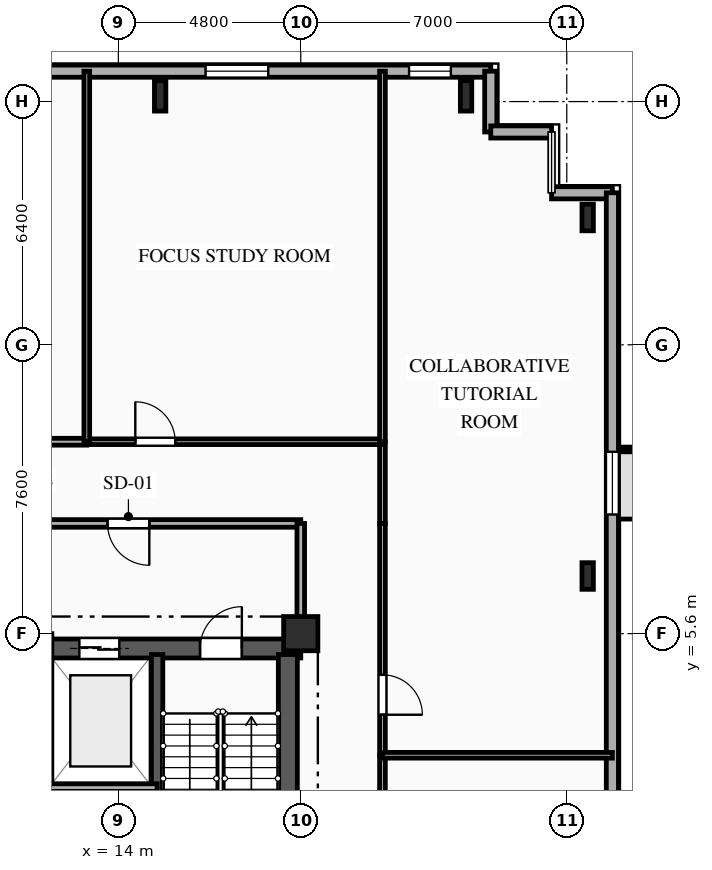
"""IFC4 building model, lengths in metres.
Left out: names, types, materials, properties, quantities, classifications, styles, units other than length and angle.
Written with IfcOpenShell. Run it as: python <this file> out.ifc"""

import sys

from ifc_helpers import new_model, si_unit, direction, frame, frame_2d, origin, origin_2d, place, context, subcontext, project, spatial, rectangle, i_section, extrude, element, fill, save


model = new_model("IFC4")
c1 = context("Model", 3, precision=1e-05, world=origin(), true_north=direction((0.0, 1.0)))
c2 = subcontext(c1, "Body", "Model", "MODEL_VIEW")
j1 = project(units=[si_unit("LENGTHUNIT", "METRE"), si_unit("PLANEANGLEUNIT", "RADIAN")], contexts=[c1])
p1 = place(None, origin())
s1 = spatial("IfcSite", under=j1, at=p1, CompositionType="ELEMENT")
p2 = place(p1, origin())
s2 = spatial("IfcBuilding", under=s1, at=p2, CompositionType="ELEMENT")
p3 = place(p2, frame((0.0, 0.0, 167.85)))
s3 = spatial("IfcBuildingStorey", under=s2, at=p3, CompositionType="ELEMENT", Elevation=167.85)
p4 = place(p3, frame((18.8, 5.6, 0.0), z_axis=(0.0, 0.0, 1.0), x_axis=(1.0, 0.0, 0.0)))
e1 = element("IfcColumn", 1, at=p4, inside=s3, PredefinedType="COLUMN", context=c2, shape_type="SweptSolid", body=[
    extrude(rectangle(XDim=0.9, YDim=0.9, at=origin_2d()), origin(), (0.0, 0.0, 1.0), 3.35),
])
for number, where, z_axis, x_axis in (
    (2, (23.15, 19.75, 0.0), (0.0, 0.0, 1.0), (1.0, 0.0, 0.0)),
    (3, (15.1, 19.75, 0.0), (0.0, 0.0, 1.0), (1.0, 0.0, 0.0)),
):
    element("IfcColumn", number, at=place(p3, frame(where, z_axis=z_axis, x_axis=x_axis)), inside=s3, PredefinedType="COLUMN", context=c2, shape_type="SweptSolid", body=[
        extrude(i_section(OverallWidth=0.3, OverallDepth=0.8, WebThickness=0.018, FlangeThickness=0.033, FilletRadius=0.03, at=origin_2d()), origin(), (0.0, 0.0, 1.0), 3.35),
    ])
for number, where, z_axis, x_axis in (
    (4, (26.35, 7.117, 0.0), (0.0, 0.0, 1.0), (1.0, 0.0, 0.0)),
    (5, (26.35, 16.55, 0.0), (0.0, 0.0, 1.0), (1.0, 0.0, 0.0)),
):
    element("IfcColumn", number, at=place(p3, frame(where, z_axis=z_axis, x_axis=x_axis)), inside=s3, PredefinedType="COLUMN", context=c2, shape_type="SweptSolid", body=[
        extrude(i_section(OverallWidth=0.3, OverallDepth=0.7, WebThickness=0.017, FlangeThickness=0.032, FilletRadius=0.027, at=origin_2d()), origin(), (0.0, 0.0, 1.0), 3.35),
    ])
p5 = place(p3, frame((-25.8, 20.4, 0.0), z_axis=(0.0, 0.0, 1.0), x_axis=(1.0, 0.0, 0.0)))
e6 = element("IfcWall", 6, at=p5, inside=s3, PredefinedType="SOLIDWALL", context=c2, shape_type="SweptSolid", body=[
    extrude(rectangle(XDim=49.6, YDim=0.32, at=frame_2d((24.8, 0.0))), origin(), (0.0, 0.0, 1.0), 3.04),
])
p6 = place(p5, frame((2.135, 0.0, 0.85)))
e7 = element("IfcOpeningElement", 7, at=p6, cuts=e6, PredefinedType="OPENING", context=c2, shape_type="SweptSolid", body=[
    extrude(rectangle(XDim=1.65, YDim=1.85, at=frame_2d((0.825, 0.925))), frame((0.0, 0.17, 0.0), z_axis=(0.0, -1.0, 0.0), x_axis=(1.0, 0.0, 0.0)), (0.0, 0.0, 1.0), 0.34),
])
p7 = place(p5, frame((6.295, 0.0, 0.85)))
e8 = element("IfcOpeningElement", 8, at=p7, cuts=e6, PredefinedType="OPENING", context=c2, shape_type="SweptSolid", body=[
    extrude(rectangle(XDim=1.65, YDim=1.85, at=frame_2d((0.825, 0.925))), frame((0.0, 0.17, 0.0), z_axis=(0.0, -1.0, 0.0), x_axis=(1.0, 0.0, 0.0)), (0.0, 0.0, 1.0), 0.34),
])
p8 = place(p5, frame((10.775, 0.0, 0.85)))
e9 = element("IfcOpeningElement", 9, at=p8, cuts=e6, PredefinedType="OPENING", context=c2, shape_type="SweptSolid", body=[
    extrude(rectangle(XDim=1.65, YDim=1.85, at=frame_2d((0.825, 0.925))), frame((0.0, 0.17, 0.0), z_axis=(0.0, -1.0, 0.0), x_axis=(1.0, 0.0, 0.0)), (0.0, 0.0, 1.0), 0.34),
])
p9 = place(p5, frame((18.44, 0.0, 0.85)))
e10 = element("IfcOpeningElement", 10, at=p9, cuts=e6, PredefinedType="OPENING", context=c2, shape_type="SweptSolid", body=[
    extrude(rectangle(XDim=1.6, YDim=1.85, at=frame_2d((0.8, 0.925))), frame((0.0, 0.17, 0.0), z_axis=(0.0, -1.0, 0.0), x_axis=(1.0, 0.0, 0.0)), (0.0, 0.0, 1.0), 0.34),
])
p10 = place(p5, frame((25.34, 0.0, 0.85)))
e11 = element("IfcOpeningElement", 11, at=p10, cuts=e6, PredefinedType="OPENING", context=c2, shape_type="SweptSolid", body=[
    extrude(rectangle(XDim=2.2, YDim=1.85, at=frame_2d((1.1, 0.925))), frame((0.0, 0.17, 0.0), z_axis=(0.0, -1.0, 0.0), x_axis=(1.0, 0.0, 0.0)), (0.0, 0.0, 1.0), 0.34),
])
p11 = place(p5, frame((33.74, 0.0, 0.85)))
e12 = element("IfcOpeningElement", 12, at=p11, cuts=e6, PredefinedType="OPENING", context=c2, shape_type="SweptSolid", body=[
    extrude(rectangle(XDim=2.2, YDim=1.85, at=frame_2d((1.1, 0.925))), frame((0.0, 0.17, 0.0), z_axis=(0.0, -1.0, 0.0), x_axis=(1.0, 0.0, 0.0)), (0.0, 0.0, 1.0), 0.34),
])
p12 = place(p5, frame((42.095, 0.0, 0.85)))
e13 = element("IfcOpeningElement", 13, at=p12, cuts=e6, PredefinedType="OPENING", context=c2, shape_type="SweptSolid", body=[
    extrude(rectangle(XDim=1.65, YDim=1.85, at=frame_2d((0.825, 0.925))), frame((0.0, 0.17, 0.0), z_axis=(0.0, -1.0, 0.0), x_axis=(1.0, 0.0, 0.0)), (0.0, 0.0, 1.0), 0.34),
])
p13 = place(p5, frame((47.45, 0.0, 0.85)))
e14 = element("IfcOpeningElement", 14, at=p13, cuts=e6, PredefinedType="OPENING", context=c2, shape_type="SweptSolid", body=[
    extrude(rectangle(XDim=1.1, YDim=1.85, at=frame_2d((0.55, 0.925))), frame((0.0, 0.17, 0.0), z_axis=(0.0, -1.0, 0.0), x_axis=(1.0, 0.0, 0.0)), (0.0, 0.0, 1.0), 0.34),
])
for number, where, z_axis, x_axis in (
    (15, (23.8, 20.4, 0.0), (0.0, 0.0, 1.0), (0.0, -1.0, 0.0)),
    (16, (23.8, 18.8, 0.0), (0.0, 0.0, 1.0), (1.0, 0.0, 0.0)),
):
    element("IfcWall", number, at=place(p3, frame(where, z_axis=z_axis, x_axis=x_axis)), inside=s3, PredefinedType="SOLIDWALL", context=c2, shape_type="SweptSolid", body=[
        extrude(rectangle(XDim=1.6, YDim=0.32, at=frame_2d((0.8, 0.0))), origin(), (0.0, 0.0, 1.0), 3.04),
    ])
p14 = place(p3, frame((25.4, 17.2, 0.0), z_axis=(0.0, 0.0, 1.0), x_axis=(1.0, 0.0, 0.0)))
e17 = element("IfcWall", 17, at=p14, inside=s3, PredefinedType="SOLIDWALL", context=c2, shape_type="SweptSolid", body=[
    extrude(rectangle(XDim=1.6, YDim=0.32, at=frame_2d((0.8, 0.0))), origin(), (0.0, 0.0, 1.0), 3.04),
])
p15 = place(p3, frame((27.0, 17.2, 0.0), z_axis=(0.0, 0.0, 1.0), x_axis=(0.0, -1.0, 0.0)))
e18 = element("IfcWall", 18, at=p15, inside=s3, PredefinedType="SOLIDWALL", context=c2, shape_type="SweptSolid", body=[
    extrude(rectangle(XDim=29.6, YDim=0.32, at=frame_2d((14.8, 0.0))), origin(), (0.0, 0.0, 1.0), 3.04),
])
p16 = place(p15, frame((6.815, 0.0, 0.85)))
e19 = element("IfcOpeningElement", 19, at=p16, cuts=e18, PredefinedType="OPENING", context=c2, shape_type="SweptSolid", body=[
    extrude(rectangle(XDim=1.65, YDim=1.85, at=frame_2d((0.825, 0.925))), frame((0.0, 0.17, 0.0), z_axis=(0.0, -1.0, 0.0), x_axis=(1.0, 0.0, 0.0)), (0.0, 0.0, 1.0), 0.34),
])
p17 = place(p15, frame((21.175, 0.0, 0.85)))
e20 = element("IfcOpeningElement", 20, at=p17, cuts=e18, PredefinedType="OPENING", context=c2, shape_type="SweptSolid", body=[
    extrude(rectangle(XDim=1.65, YDim=1.85, at=frame_2d((0.825, 0.925))), frame((0.0, 0.17, 0.0), z_axis=(0.0, -1.0, 0.0), x_axis=(1.0, 0.0, 0.0)), (0.0, 0.0, 1.0), 0.34),
])
p18 = place(p3, frame((9.2, 5.21, 0.0), z_axis=(0.0, 0.0, 1.0), x_axis=(1.0, 0.0, 0.0)))
e21 = element("IfcWall", 21, at=p18, inside=s3, PredefinedType="SHEAR", context=c2, shape_type="SweptSolid", body=[
    extrude(rectangle(XDim=9.6, YDim=0.5, at=frame_2d((4.8, 0.0))), origin(), (0.0, 0.0, 1.0), 3.04),
])
p19 = place(p18, frame((6.95, 0.0, 0.0)))
e22 = element("IfcOpeningElement", 22, at=p19, cuts=e21, PredefinedType="OPENING", context=c2, shape_type="SweptSolid", body=[
    extrude(rectangle(XDim=1.1, YDim=2.15, at=frame_2d((0.55, 1.075))), frame((0.0, 0.26, 0.0), z_axis=(0.0, -1.0, 0.0), x_axis=(1.0, 0.0, 0.0)), (0.0, 0.0, 1.0), 0.52),
])
p20 = place(p18, frame((3.775, 0.0, 0.0)))
e23 = element("IfcOpeningElement", 23, at=p20, cuts=e21, PredefinedType="OPENING", context=c2, shape_type="SweptSolid", body=[
    extrude(rectangle(XDim=1.05, YDim=2.1, at=frame_2d((0.525, 1.05))), frame((0.0, 0.26, 0.0), z_axis=(0.0, -1.0, 0.0), x_axis=(1.0, 0.0, 0.0)), (0.0, 0.0, 1.0), 0.52),
])
p21 = place(p3, frame((18.46, -5.05, 0.0), z_axis=(0.0, 0.0, 1.0), x_axis=(0.0, 1.0, 0.0)))
e24 = element("IfcWall", 24, at=p21, inside=s3, PredefinedType="SHEAR", context=c2, shape_type="SweptSolid", body=[
    extrude(rectangle(XDim=10.1, YDim=0.5, at=frame_2d((5.05, 0.0))), origin(), (0.0, 0.0, 1.0), 3.04),
])
p22 = place(p3, frame((15.02, -5.05, 0.0), z_axis=(0.0, 0.0, 1.0), x_axis=(0.0, 1.0, 0.0)))
e25 = element("IfcWall", 25, at=p22, inside=s3, PredefinedType="SHEAR", context=c2, shape_type="SweptSolid", body=[
    extrude(rectangle(XDim=10.1, YDim=0.3, at=frame_2d((5.05, 0.0))), origin(), (0.0, 0.0, 1.0), 3.04),
])
p23 = place(p3, frame((12.15, 5.6, 0.0), z_axis=(0.0, 0.0, 1.0), x_axis=(0.0, -1.0, 0.0)))
e26 = element("IfcWall", 26, at=p23, inside=s3, PredefinedType="PARTITIONING", context=c2, shape_type="SweptSolid", body=[
    extrude(rectangle(XDim=4.05, YDim=0.2, at=frame_2d((2.025, 0.0))), origin(), (0.0, 0.0, 1.0), 3.04),
])
p24 = place(p3, frame((18.8, 8.5, 0.0), z_axis=(0.0, 0.0, 1.0), x_axis=(-1.0, 0.0, 0.0)))
e27 = element("IfcWall", 27, at=p24, inside=s3, PredefinedType="PARTITIONING", context=c2, shape_type="SweptSolid", body=[
    extrude(rectangle(XDim=6.8, YDim=0.2, at=frame_2d((3.4, 0.0))), origin(), (0.0, 0.0, 1.0), 3.04),
])
p25 = place(p24, frame((3.985, 0.0, 0.0)))
e28 = element("IfcOpeningElement", 28, at=p25, cuts=e27, PredefinedType="OPENING", context=c2, shape_type="SweptSolid", body=[
    extrude(rectangle(XDim=1.1, YDim=2.15, at=frame_2d((0.55, 1.075))), frame((0.0, 0.11, 0.0), z_axis=(0.0, -1.0, 0.0), x_axis=(1.0, 0.0, 0.0)), (0.0, 0.0, 1.0), 0.22),
])
p26 = place(p3, frame((18.8, 5.6, 0.0), z_axis=(0.0, 0.0, 1.0), x_axis=(0.0, 1.0, 0.0)))
e29 = element("IfcWall", 29, at=p26, inside=s3, PredefinedType="PARTITIONING", context=c2, shape_type="SweptSolid", body=[
    extrude(rectangle(XDim=2.9, YDim=0.2, at=frame_2d((1.45, 0.0))), origin(), (0.0, 0.0, 1.0), 2.525),
])
p27 = place(p3, frame((13.34, -0.75, 0.0), z_axis=(0.0, 0.0, 1.0), x_axis=(0.0, 1.0, 0.0)))
e30 = element("IfcWall", 30, at=p27, inside=s3, PredefinedType="PARTITIONING", context=c2, shape_type="SweptSolid", body=[
    extrude(rectangle(XDim=2.3, YDim=0.2, at=frame_2d((1.15, 0.0))), origin(), (0.0, 0.0, 1.0), 3.04),
])
p28 = place(p3, frame((20.95, 10.65, 0.0), z_axis=(0.0, 0.0, 1.0), x_axis=(0.0, -1.0, 0.0)))
e31 = element("IfcWall", 31, at=p28, inside=s3, PredefinedType="PARTITIONING", context=c2, shape_type="SweptSolid", body=[
    extrude(rectangle(XDim=2.15, YDim=0.15, at=frame_2d((1.075, 0.0))), origin(), (0.0, 0.0, 1.0), 3.04),
])
p29 = place(p3, frame((7.24, 10.65, 0.0), z_axis=(0.0, 0.0, 1.0), x_axis=(1.0, 0.0, 0.0)))
e32 = element("IfcWall", 32, at=p29, inside=s3, PredefinedType="PARTITIONING", context=c2, shape_type="SweptSolid", body=[
    extrude(rectangle(XDim=5.93, YDim=0.18, at=frame_2d((2.965, 0.0))), origin(), (0.0, 0.0, 1.0), 3.04),
])
p30 = place(p29, frame((3.879, 0.0, 0.0)))
e33 = element("IfcOpeningElement", 33, at=p30, cuts=e32, PredefinedType="OPENING", context=c2, shape_type="SweptSolid", body=[
    extrude(rectangle(XDim=1.0, YDim=2.15, at=frame_2d((0.5, 1.075))), frame((0.0, 0.1, 0.0), z_axis=(0.0, -1.0, 0.0), x_axis=(1.0, 0.0, 0.0)), (0.0, 0.0, 1.0), 0.2),
])
p31 = place(p3, frame((13.17, 10.65, 0.0), z_axis=(0.0, 0.0, 1.0), x_axis=(1.0, 0.0, 0.0)))
e34 = element("IfcWall", 34, at=p31, inside=s3, PredefinedType="PARTITIONING", context=c2, shape_type="SweptSolid", body=[
    extrude(rectangle(XDim=7.78, YDim=0.15, at=frame_2d((3.89, 0.0))), origin(), (0.0, 0.0, 1.0), 3.04),
])
p32 = place(p31, frame((1.276, 0.0, 0.0)))
e35 = element("IfcOpeningElement", 35, at=p32, cuts=e34, PredefinedType="OPENING", context=c2, shape_type="SweptSolid", body=[
    extrude(rectangle(XDim=1.05, YDim=2.15, at=frame_2d((0.525, 1.075))), frame((0.0, 0.085, 0.0), z_axis=(0.0, -1.0, 0.0), x_axis=(1.0, 0.0, 0.0)), (0.0, 0.0, 1.0), 0.17),
])
p33 = place(p3, frame((20.95, 2.4, 0.0), z_axis=(0.0, 0.0, 1.0), x_axis=(0.0, -1.0, 0.0)))
e36 = element("IfcWall", 36, at=p33, inside=s3, PredefinedType="PARTITIONING", context=c2, shape_type="SweptSolid", body=[
    extrude(rectangle(XDim=8.0, YDim=0.15, at=frame_2d((4.0, 0.0))), origin(), (0.0, 0.0, 1.0), 3.04),
])
p34 = place(p33, frame((2.028, 0.0, 0.0)))
e37 = element("IfcOpeningElement", 37, at=p34, cuts=e36, PredefinedType="OPENING", context=c2, shape_type="SweptSolid", body=[
    extrude(rectangle(XDim=1.05, YDim=2.15, at=frame_2d((0.525, 1.075))), frame((0.0, 0.085, 0.0), z_axis=(0.0, -1.0, 0.0), x_axis=(1.0, 0.0, 0.0)), (0.0, 0.0, 1.0), 0.17),
])
p35 = place(p3, frame((20.95, 8.5, 0.0), z_axis=(0.0, 0.0, 1.0), x_axis=(0.0, -1.0, 0.0)))
e38 = element("IfcWall", 38, at=p35, inside=s3, PredefinedType="PARTITIONING", context=c2, shape_type="SweptSolid", body=[
    extrude(rectangle(XDim=6.1, YDim=0.15, at=frame_2d((3.05, 0.0))), origin(), (0.0, 0.0, 1.0), 3.04),
])
p36 = place(p35, frame((3.984, 0.0, 0.0)))
e39 = element("IfcOpeningElement", 39, at=p36, cuts=e38, PredefinedType="OPENING", context=c2, shape_type="SweptSolid", body=[
    extrude(rectangle(XDim=1.05, YDim=2.15, at=frame_2d((0.525, 1.075))), frame((0.0, 0.085, 0.0), z_axis=(0.0, -1.0, 0.0), x_axis=(1.0, 0.0, 0.0)), (0.0, 0.0, 1.0), 0.17),
])
p37 = place(p3, frame((20.95, 2.4, 0.0), z_axis=(0.0, 0.0, 1.0), x_axis=(1.0, 0.0, 0.0)))
e40 = element("IfcWall", 40, at=p37, inside=s3, PredefinedType="PARTITIONING", context=c2, shape_type="SweptSolid", body=[
    extrude(rectangle(XDim=6.05, YDim=0.15, at=frame_2d((3.025, 0.0))), origin(), (0.0, 0.0, 1.0), 3.04),
])
p38 = place(p3, frame((20.95, 10.65, 0.0), z_axis=(0.0, 0.0, 1.0), x_axis=(0.0, 1.0, 0.0)))
e41 = element("IfcWall", 41, at=p38, inside=s3, PredefinedType="PARTITIONING", context=c2, shape_type="SweptSolid", body=[
    extrude(rectangle(XDim=9.75, YDim=0.15, at=frame_2d((4.875, 0.0))), origin(), (0.0, 0.0, 1.0), 2.525),
])
p39 = place(p3, frame((13.17, 20.4, 0.0), z_axis=(0.0, 0.0, 1.0), x_axis=(0.0, -1.0, 0.0)))
e42 = element("IfcWall", 42, at=p39, inside=s3, PredefinedType="PARTITIONING", context=c2, shape_type="SweptSolid", body=[
    extrude(rectangle(XDim=9.75, YDim=0.15, at=frame_2d((4.875, 0.0))), origin(), (0.0, 0.0, 1.0), 3.04),
])
p40 = place(p3, frame((9.2, 1.55, 0.0), z_axis=(0.0, 0.0, 1.0), x_axis=(1.0, 0.0, 0.0)))
e43 = element("IfcWall", 43, at=p40, inside=s3, PredefinedType="PARTITIONING", context=c2, shape_type="SweptSolid", body=[
    extrude(rectangle(XDim=5.82, YDim=0.2, at=frame_2d((2.91, 0.0))), origin(), (0.0, 0.0, 1.0), 3.04),
])
p41 = place(p12, origin())
e44 = element("IfcWindow", 44, at=p41, inside=s3, PartitioningType="SINGLE_PANEL", PredefinedType="WINDOW", context=c2, shape_type="SweptSolid", body=[
    extrude(rectangle(XDim=1.65, YDim=1.85, at=frame_2d((0.825, 0.925))), frame((0.0, 0.03, 0.0), z_axis=(0.0, -1.0, 0.0), x_axis=(1.0, 0.0, 0.0)), (0.0, 0.0, 1.0), 0.06),
])
fill(e13, e44)
p42 = place(p13, origin())
e45 = element("IfcWindow", 45, at=p42, inside=s3, PartitioningType="SINGLE_PANEL", PredefinedType="WINDOW", context=c2, shape_type="SweptSolid", body=[
    extrude(rectangle(XDim=1.1, YDim=1.85, at=frame_2d((0.55, 0.925))), frame((0.0, 0.03, 0.0), z_axis=(0.0, -1.0, 0.0), x_axis=(1.0, 0.0, 0.0)), (0.0, 0.0, 1.0), 0.06),
])
fill(e14, e45)
p43 = place(p16, origin())
e46 = element("IfcWindow", 46, at=p43, inside=s3, PartitioningType="SINGLE_PANEL", PredefinedType="WINDOW", context=c2, shape_type="SweptSolid", body=[
    extrude(rectangle(XDim=1.65, YDim=1.85, at=frame_2d((0.825, 0.925))), frame((0.0, 0.03, 0.0), z_axis=(0.0, -1.0, 0.0), x_axis=(1.0, 0.0, 0.0)), (0.0, 0.0, 1.0), 0.06),
])
fill(e19, e46)
p44 = place(p19, origin())
e47 = element("IfcDoor", 47, at=p44, inside=s3, OperationType="SINGLE_SWING_RIGHT", PredefinedType="DOOR", context=c2, shape_type="SweptSolid", body=[
    extrude(rectangle(XDim=1.1, YDim=2.15, at=frame_2d((0.55, 1.075))), frame((0.0, 0.025, 0.0), z_axis=(0.0, -1.0, 0.0), x_axis=(1.0, 0.0, 0.0)), (0.0, 0.0, 1.0), 0.05),
])
fill(e22, e47)
p45 = place(p20, origin())
e48 = element("IfcDoor", 48, at=p45, inside=s3, OperationType="DOUBLE_DOOR_SLIDING", PredefinedType="DOOR", context=c2, shape_type="SweptSolid", body=[
    extrude(rectangle(XDim=1.05, YDim=2.1, at=frame_2d((0.525, 1.05))), frame((0.0, 0.025, 0.0), z_axis=(0.0, -1.0, 0.0), x_axis=(1.0, 0.0, 0.0)), (0.0, 0.0, 1.0), 0.05),
])
fill(e23, e48)
p46 = place(p25, origin())
e49 = element("IfcDoor", 49, at=p46, inside=s3, OperationType="SINGLE_SWING_LEFT", PredefinedType="DOOR", context=c2, shape_type="SweptSolid", body=[
    extrude(rectangle(XDim=1.1, YDim=2.15, at=frame_2d((0.55, 1.075))), frame((0.0, 0.025, 0.0), z_axis=(0.0, -1.0, 0.0), x_axis=(1.0, 0.0, 0.0)), (0.0, 0.0, 1.0), 0.05),
])
fill(e28, e49)
p47 = place(p32, origin())
e50 = element("IfcDoor", 50, at=p47, inside=s3, OperationType="SINGLE_SWING_LEFT", PredefinedType="DOOR", context=c2, shape_type="SweptSolid", body=[
    extrude(rectangle(XDim=1.05, YDim=2.15, at=frame_2d((0.525, 1.075))), frame((0.0, 0.025, 0.0), z_axis=(0.0, -1.0, 0.0), x_axis=(1.0, 0.0, 0.0)), (0.0, 0.0, 1.0), 0.05),
])
fill(e35, e50)
p48 = place(p36, origin())
e51 = element("IfcDoor", 51, at=p48, inside=s3, OperationType="SINGLE_SWING_RIGHT", PredefinedType="DOOR", context=c2, shape_type="SweptSolid", body=[
    extrude(rectangle(XDim=1.05, YDim=2.15, at=frame_2d((0.525, 1.075))), frame((0.0, 0.025, 0.0), z_axis=(0.0, -1.0, 0.0), x_axis=(1.0, 0.0, 0.0)), (0.0, 0.0, 1.0), 0.05),
])
fill(e39, e51)
save(model, sys.argv[1])
